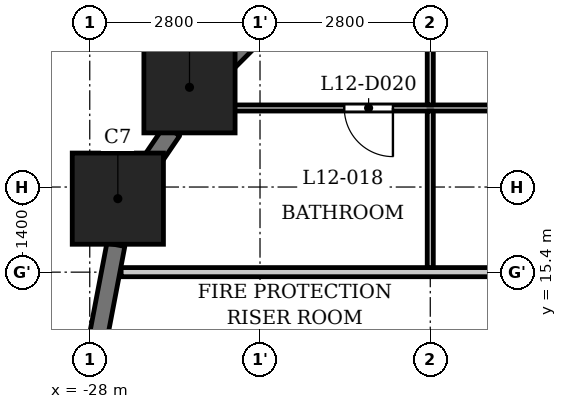
"""IFC4 building model, lengths in metres.
Left out: names, types, materials, properties, quantities, classifications, styles, units other than length and angle.
Written with IfcOpenShell. Run it as: python <this file> out.ifc"""

import sys

from ifc_helpers import new_model, si_unit, direction, frame, frame_2d, origin, origin_2d, place, context, subcontext, project, spatial, rectangle, extrude, element, fill, save


model = new_model("IFC4")
c1 = context("Model", 3, precision=1e-05, world=origin(), true_north=direction((0.0, 1.0)))
c2 = subcontext(c1, "Body", "Model", "MODEL_VIEW")
j1 = project(units=[si_unit("LENGTHUNIT", "METRE"), si_unit("PLANEANGLEUNIT", "RADIAN")], contexts=[c1])
p1 = place(None, origin())
s1 = spatial("IfcSite", under=j1, at=p1, CompositionType="ELEMENT")
p2 = place(p1, origin())
s2 = spatial("IfcBuilding", under=s1, at=p2, CompositionType="ELEMENT")
p3 = place(p2, frame((0.0, 0.0, 51.5)))
s3 = spatial("IfcBuildingStorey", under=s2, at=p3, CompositionType="ELEMENT", Elevation=51.5)
for number, where, z_axis, x_axis in (
    (1, (-26.36, 18.44, 0.0), (0.0, 0.0, 1.0), (1.0, 0.0, 0.0)),
    (2, (-27.538, 16.609, 0.0), (0.0, 0.0, 1.0), (1.0, 0.0, 0.0)),
):
    element("IfcColumn", number, at=place(p3, frame(where, z_axis=z_axis, x_axis=x_axis)), inside=s3, PredefinedType="COLUMN", context=c2, shape_type="SweptSolid", body=[
        extrude(rectangle(XDim=1.5, YDim=1.5, at=origin_2d()), origin(), (0.0, 0.0, 1.0), 3.5),
    ])
p4 = place(p3, frame((-23.991, 20.597, 0.0), z_axis=(0.0, 0.0, 1.0), x_axis=(-0.707106781187, -0.707106781187, 0.0)))
e3 = element("IfcWall", 3, at=p4, inside=s3, PredefinedType="SOLIDWALL", context=c2, shape_type="SweptSolid", body=[
    extrude(rectangle(XDim=2.45, YDim=0.3, at=frame_2d((1.225, 0.0))), origin(), (0.0, 0.0, 1.0), 2.35),
])
p5 = place(p4, frame((0.825, 0.0, 0.6)))
e4 = element("IfcOpeningElement", 4, at=p5, cuts=e3, PredefinedType="OPENING", context=c2, shape_type="SweptSolid", body=[
    extrude(rectangle(XDim=0.8, YDim=1.55, at=frame_2d((0.4, 0.775))), frame((0.0, 0.16, 0.0), z_axis=(0.0, -1.0, 0.0), x_axis=(1.0, 0.0, 0.0)), (0.0, 0.0, 1.0), 0.32),
])
p6 = place(p3, frame((-26.645, 17.727, 0.0), z_axis=(0.0, 0.0, 1.0), x_axis=(-0.562083182981, -0.827080706709, 0.0)))
e5 = element("IfcWall", 5, at=p6, inside=s3, PredefinedType="SOLIDWALL", context=c2, shape_type="SweptSolid", body=[
    extrude(rectangle(XDim=0.677, YDim=0.3, at=frame_2d((0.339, 0.0))), origin(), (0.0, 0.0, 1.0), 3.2),
])
p7 = place(p3, frame((-27.571, 15.851, 0.0), z_axis=(0.0, 0.0, 1.0), x_axis=(-0.187223837635, -0.982317277982, 0.0)))
e6 = element("IfcWall", 6, at=p7, inside=s3, PredefinedType="SOLIDWALL", context=c2, shape_type="SweptSolid", body=[
    extrude(rectangle(XDim=1.506, YDim=0.3, at=frame_2d((0.753, 0.0))), origin(), (0.0, 0.0, 1.0), 2.35),
])
p8 = place(p3, frame((-27.484, 15.4, 0.0), z_axis=(0.0, 0.0, 1.0), x_axis=(1.0, 0.0, 0.0)))
e7 = element("IfcWall", 7, at=p8, inside=s3, PredefinedType="PARTITIONING", context=c2, shape_type="SweptSolid", body=[
    extrude(rectangle(XDim=54.968, YDim=0.15, at=frame_2d((27.484, 0.0))), origin(), (0.0, 0.0, 1.0), 3.2),
])
p9 = place(p8, frame((8.784, 0.0, 0.0)))
e8 = element("IfcOpeningElement", 8, at=p9, cuts=e7, PredefinedType="OPENING", context=c2, shape_type="SweptSolid", body=[
    extrude(rectangle(XDim=1.0, YDim=2.1, at=frame_2d((0.5, 1.05))), frame((0.0, 0.085, 0.0), z_axis=(0.0, -1.0, 0.0), x_axis=(1.0, 0.0, 0.0)), (0.0, 0.0, 1.0), 0.17),
])
p10 = place(p8, frame((12.034, 0.0, 0.0)))
e9 = element("IfcOpeningElement", 9, at=p10, cuts=e7, PredefinedType="OPENING", context=c2, shape_type="SweptSolid", body=[
    extrude(rectangle(XDim=1.0, YDim=2.1, at=frame_2d((0.5, 1.05))), frame((0.0, 0.085, 0.0), z_axis=(0.0, -1.0, 0.0), x_axis=(1.0, 0.0, 0.0)), (0.0, 0.0, 1.0), 0.17),
])
p11 = place(p8, frame((16.984, 0.0, 0.0)))
e10 = element("IfcOpeningElement", 10, at=p11, cuts=e7, PredefinedType="OPENING", context=c2, shape_type="SweptSolid", body=[
    extrude(rectangle(XDim=1.0, YDim=2.1, at=frame_2d((0.5, 1.05))), frame((0.0, 0.085, 0.0), z_axis=(0.0, -1.0, 0.0), x_axis=(1.0, 0.0, 0.0)), (0.0, 0.0, 1.0), 0.17),
])
p12 = place(p8, frame((28.184, 0.0, 0.0)))
e11 = element("IfcOpeningElement", 11, at=p12, cuts=e7, PredefinedType="OPENING", context=c2, shape_type="SweptSolid", body=[
    extrude(rectangle(XDim=1.0, YDim=2.1, at=frame_2d((0.5, 1.05))), frame((0.0, 0.085, 0.0), z_axis=(0.0, -1.0, 0.0), x_axis=(1.0, 0.0, 0.0)), (0.0, 0.0, 1.0), 0.17),
])
p13 = place(p8, frame((48.234, 0.0, 0.0)))
e12 = element("IfcOpeningElement", 12, at=p13, cuts=e7, PredefinedType="OPENING", context=c2, shape_type="SweptSolid", body=[
    extrude(rectangle(XDim=1.0, YDim=2.1, at=frame_2d((0.5, 1.05))), frame((0.0, 0.085, 0.0), z_axis=(0.0, -1.0, 0.0), x_axis=(1.0, 0.0, 0.0)), (0.0, 0.0, 1.0), 0.17),
])
p14 = place(p3, frame((-26.44, 18.1, 0.0), z_axis=(0.0, 0.0, 1.0), x_axis=(1.0, 0.0, 0.0)))
e13 = element("IfcWall", 13, at=p14, inside=s3, PredefinedType="PARTITIONING", context=c2, shape_type="SweptSolid", body=[
    extrude(rectangle(XDim=52.63, YDim=0.1, at=frame_2d((26.315, 0.0))), origin(), (0.0, 0.0, 1.0), 3.2),
])
p15 = place(p14, frame((2.626, 0.0, 0.0)))
e14 = element("IfcOpeningElement", 14, at=p15, cuts=e13, PredefinedType="OPENING", context=c2, shape_type="SweptSolid", body=[
    extrude(rectangle(XDim=0.8, YDim=2.1, at=frame_2d((0.4, 1.05))), frame((0.0, 0.06, 0.0), z_axis=(0.0, -1.0, 0.0), x_axis=(1.0, 0.0, 0.0)), (0.0, 0.0, 1.0), 0.12),
])
p16 = place(p14, frame((7.84, 0.0, 0.0)))
e15 = element("IfcOpeningElement", 15, at=p16, cuts=e13, PredefinedType="OPENING", context=c2, shape_type="SweptSolid", body=[
    extrude(rectangle(XDim=0.9, YDim=2.1, at=frame_2d((0.45, 1.05))), frame((0.0, 0.06, 0.0), z_axis=(0.0, -1.0, 0.0), x_axis=(1.0, 0.0, 0.0)), (0.0, 0.0, 1.0), 0.12),
])
p17 = place(p14, frame((13.79, 0.0, 0.0)))
e16 = element("IfcOpeningElement", 16, at=p17, cuts=e13, PredefinedType="OPENING", context=c2, shape_type="SweptSolid", body=[
    extrude(rectangle(XDim=0.8, YDim=2.1, at=frame_2d((0.4, 1.05))), frame((0.0, 0.06, 0.0), z_axis=(0.0, -1.0, 0.0), x_axis=(1.0, 0.0, 0.0)), (0.0, 0.0, 1.0), 0.12),
])
p18 = place(p14, frame((11.09, 0.0, 0.0)))
e17 = element("IfcOpeningElement", 17, at=p18, cuts=e13, PredefinedType="OPENING", context=c2, shape_type="SweptSolid", body=[
    extrude(rectangle(XDim=0.9, YDim=2.1, at=frame_2d((0.45, 1.05))), frame((0.0, 0.06, 0.0), z_axis=(0.0, -1.0, 0.0), x_axis=(1.0, 0.0, 0.0)), (0.0, 0.0, 1.0), 0.12),
])
p19 = place(p14, frame((21.49, 0.0, 0.0)))
e18 = element("IfcOpeningElement", 18, at=p19, cuts=e13, PredefinedType="OPENING", context=c2, shape_type="SweptSolid", body=[
    extrude(rectangle(XDim=0.8, YDim=2.1, at=frame_2d((0.4, 1.05))), frame((0.0, 0.06, 0.0), z_axis=(0.0, -1.0, 0.0), x_axis=(1.0, 0.0, 0.0)), (0.0, 0.0, 1.0), 0.12),
])
p20 = place(p14, frame((15.79, 0.0, 0.0)))
e19 = element("IfcOpeningElement", 19, at=p20, cuts=e13, PredefinedType="OPENING", context=c2, shape_type="SweptSolid", body=[
    extrude(rectangle(XDim=0.9, YDim=2.1, at=frame_2d((0.45, 1.05))), frame((0.0, 0.06, 0.0), z_axis=(0.0, -1.0, 0.0), x_axis=(1.0, 0.0, 0.0)), (0.0, 0.0, 1.0), 0.12),
])
p21 = place(p14, frame((27.49, 0.0, 0.0)))
e20 = element("IfcOpeningElement", 20, at=p21, cuts=e13, PredefinedType="OPENING", context=c2, shape_type="SweptSolid", body=[
    extrude(rectangle(XDim=0.9, YDim=2.1, at=frame_2d((0.45, 1.05))), frame((0.0, 0.06, 0.0), z_axis=(0.0, -1.0, 0.0), x_axis=(1.0, 0.0, 0.0)), (0.0, 0.0, 1.0), 0.12),
])
p22 = place(p14, frame((29.74, 0.0, 0.0)))
e21 = element("IfcOpeningElement", 21, at=p22, cuts=e13, PredefinedType="OPENING", context=c2, shape_type="SweptSolid", body=[
    extrude(rectangle(XDim=0.9, YDim=2.1, at=frame_2d((0.45, 1.05))), frame((0.0, 0.06, 0.0), z_axis=(0.0, -1.0, 0.0), x_axis=(1.0, 0.0, 0.0)), (0.0, 0.0, 1.0), 0.12),
])
p23 = place(p14, frame((35.84, 0.0, 0.0)))
e22 = element("IfcOpeningElement", 22, at=p23, cuts=e13, PredefinedType="OPENING", context=c2, shape_type="SweptSolid", body=[
    extrude(rectangle(XDim=0.9, YDim=2.1, at=frame_2d((0.45, 1.05))), frame((0.0, 0.06, 0.0), z_axis=(0.0, -1.0, 0.0), x_axis=(1.0, 0.0, 0.0)), (0.0, 0.0, 1.0), 0.12),
])
p24 = place(p14, frame((50.74, 0.0, 0.0)))
e23 = element("IfcOpeningElement", 23, at=p24, cuts=e13, PredefinedType="OPENING", context=c2, shape_type="SweptSolid", body=[
    extrude(rectangle(XDim=0.8, YDim=2.1, at=frame_2d((0.4, 1.05))), frame((0.0, 0.06, 0.0), z_axis=(0.0, -1.0, 0.0), x_axis=(1.0, 0.0, 0.0)), (0.0, 0.0, 1.0), 0.12),
])
p25 = place(p14, frame((47.29, 0.0, 0.0)))
e24 = element("IfcOpeningElement", 24, at=p25, cuts=e13, PredefinedType="OPENING", context=c2, shape_type="SweptSolid", body=[
    extrude(rectangle(XDim=0.9, YDim=2.1, at=frame_2d((0.45, 1.05))), frame((0.0, 0.06, 0.0), z_axis=(0.0, -1.0, 0.0), x_axis=(1.0, 0.0, 0.0)), (0.0, 0.0, 1.0), 0.12),
])
p26 = place(p3, frame((-22.4, 15.475, 0.0), z_axis=(0.0, 0.0, 1.0), x_axis=(0.0, 1.0, 0.0)))
e25 = element("IfcWall", 25, at=p26, inside=s3, PredefinedType="PARTITIONING", context=c2, shape_type="SweptSolid", body=[
    extrude(rectangle(XDim=2.575, YDim=0.1, at=frame_2d((1.288, 0.0))), origin(), (0.0, 0.0, 1.0), 3.2),
])
p27 = place(p3, frame((-22.4, 18.15, 0.0), z_axis=(0.0, 0.0, 1.0), x_axis=(0.0, 1.0, 0.0)))
e26 = element("IfcWall", 26, at=p27, inside=s3, PredefinedType="PARTITIONING", context=c2, shape_type="SweptSolid", body=[
    extrude(rectangle(XDim=3.57, YDim=0.1, at=frame_2d((1.785, 0.0))), origin(), (0.0, 0.0, 1.0), 3.2),
])
p28 = place(p27, frame((1.298, 0.0, 0.0)))
e27 = element("IfcOpeningElement", 27, at=p28, cuts=e26, PredefinedType="OPENING", context=c2, shape_type="SweptSolid", body=[
    extrude(rectangle(XDim=0.9, YDim=2.1, at=frame_2d((0.45, 1.05))), frame((0.0, 0.06, 0.0), z_axis=(0.0, -1.0, 0.0), x_axis=(1.0, 0.0, 0.0)), (0.0, 0.0, 1.0), 0.12),
])
p29 = place(p15, origin())
e28 = element("IfcDoor", 28, at=p29, inside=s3, OperationType="SINGLE_SWING_RIGHT", PredefinedType="DOOR", context=c2, shape_type="SweptSolid", body=[
    extrude(rectangle(XDim=0.8, YDim=2.1, at=frame_2d((0.4, 1.05))), frame((0.0, 0.025, 0.0), z_axis=(0.0, -1.0, 0.0), x_axis=(1.0, 0.0, 0.0)), (0.0, 0.0, 1.0), 0.05),
])
fill(e14, e28)
save(model, sys.argv[1])
